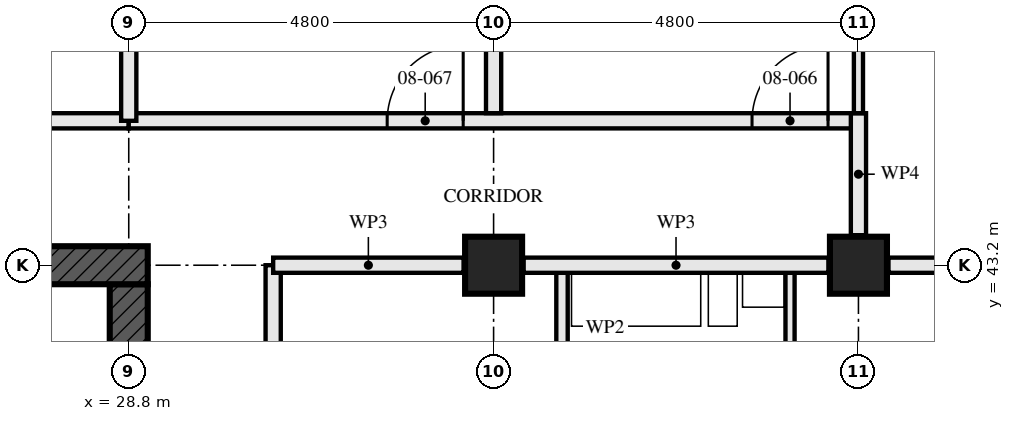
"""IFC4 building model, lengths in metres.
Left out: names, types, materials, properties, quantities, classifications, styles, units other than length and angle.
Written with IfcOpenShell. Run it as: python <this file> out.ifc"""

import sys

from ifc_helpers import new_model, si_unit, direction, frame, frame_2d, origin, origin_2d, place, context, subcontext, project, spatial, rectangle, hollow_rectangle, extrude, element, fill, save


model = new_model("IFC4")
c1 = context("Model", 3, precision=1e-05, world=origin(), true_north=direction((0.0, 1.0)))
c2 = subcontext(c1, "Body", "Model", "MODEL_VIEW")
j1 = project(units=[si_unit("LENGTHUNIT", "METRE"), si_unit("PLANEANGLEUNIT", "RADIAN")], contexts=[c1])
p1 = place(None, origin())
s1 = spatial("IfcSite", under=j1, at=p1, CompositionType="ELEMENT")
p2 = place(p1, origin())
s2 = spatial("IfcBuilding", under=s1, at=p2, CompositionType="ELEMENT")
p3 = place(p2, frame((0.0, 0.0, 34.0)))
s3 = spatial("IfcBuildingStorey", under=s2, at=p3, CompositionType="ELEMENT", Elevation=34.0)
for number, where, z_axis, x_axis in (
    (1, (33.6, 43.2, 0.0), (0.0, 0.0, 1.0), (0.0, 1.0, 0.0)),
    (2, (38.4, 43.2, 0.0), (0.0, 0.0, 1.0), (0.0, 1.0, 0.0)),
):
    element("IfcColumn", number, at=place(p3, frame(where, z_axis=z_axis, x_axis=x_axis)), inside=s3, PredefinedType="COLUMN", context=c2, shape_type="SweptSolid", body=[
        extrude(hollow_rectangle(XDim=0.75, YDim=0.75, WallThickness=0.08, at=origin_2d()), origin(), (0.0, 0.0, 1.0), 3.5),
    ])
p4 = place(p3, frame((29.05, 43.2, -0.17), z_axis=(0.0, 0.0, 1.0), x_axis=(-1.0, 0.0, 0.0)))
e3 = element("IfcWall", 3, at=p4, inside=s3, PredefinedType="SHEAR", context=c2, shape_type="SweptSolid", body=[
    extrude(rectangle(XDim=14.9, YDim=0.5, at=frame_2d((7.45, 0.0))), origin(), (0.0, 0.0, 1.0), 3.5),
])
p5 = place(p4, frame((6.85, 0.0, 0.17)))
e4 = element("IfcOpeningElement", 4, at=p5, cuts=e3, PredefinedType="OPENING", context=c2, shape_type="SweptSolid", body=[
    extrude(rectangle(XDim=1.2, YDim=2.1, at=frame_2d((0.6, 1.05))), frame((0.0, 0.26, 0.0), z_axis=(0.0, -1.0, 0.0), x_axis=(1.0, 0.0, 0.0)), (0.0, 0.0, 1.0), 0.521),
])
p6 = place(p3, frame((28.8, 29.05, -0.17), z_axis=(0.0, 0.0, 1.0), x_axis=(0.0, 1.0, 0.0)))
e5 = element("IfcWall", 5, at=p6, inside=s3, PredefinedType="SHEAR", context=c2, shape_type="SweptSolid", body=[
    extrude(rectangle(XDim=13.9, YDim=0.5, at=frame_2d((6.95, 0.0))), origin(), (0.0, 0.0, 1.0), 3.5),
])
p7 = place(p6, frame((6.35, 0.0, 0.17)))
e6 = element("IfcOpeningElement", 6, at=p7, cuts=e5, PredefinedType="OPENING", context=c2, shape_type="SweptSolid", body=[
    extrude(rectangle(XDim=1.2, YDim=2.1, at=frame_2d((0.6, 1.05))), frame((0.0, 0.26, 0.0), z_axis=(0.0, -1.0, 0.0), x_axis=(1.0, 0.0, 0.0)), (0.0, 0.0, 1.0), 0.521),
])
p8 = place(p3, frame((28.8, 45.1, 0.0), z_axis=(0.0, 0.0, 1.0), x_axis=(-1.0, 0.0, 0.0)))
e7 = element("IfcWall", 7, at=p8, inside=s3, PredefinedType="PARTITIONING", context=c2, shape_type="SweptSolid", body=[
    extrude(rectangle(XDim=14.4, YDim=0.2, at=frame_2d((7.2, 0.0))), origin(), (0.0, 0.0, 1.0), 3.33),
])
p9 = place(p8, frame((5.2, 0.0, 0.0)))
e8 = element("IfcOpeningElement", 8, at=p9, cuts=e7, PredefinedType="OPENING", context=c2, shape_type="SweptSolid", body=[
    extrude(rectangle(XDim=1.0, YDim=2.1, at=frame_2d((0.5, 1.05))), frame((0.0, 0.111, 0.0), z_axis=(0.0, -1.0, 0.0), x_axis=(1.0, 0.0, 0.0)), (0.0, 0.0, 1.0), 0.221),
])
p10 = place(p8, frame((10.0, 0.0, 0.0)))
e9 = element("IfcOpeningElement", 9, at=p10, cuts=e7, PredefinedType="OPENING", context=c2, shape_type="SweptSolid", body=[
    extrude(rectangle(XDim=1.0, YDim=2.1, at=frame_2d((0.5, 1.05))), frame((0.0, 0.111, 0.0), z_axis=(0.0, -1.0, 0.0), x_axis=(1.0, 0.0, 0.0)), (0.0, 0.0, 1.0), 0.221),
])
p11 = place(p3, frame((34.5, 40.4, 0.0), z_axis=(0.0, 0.0, 1.0), x_axis=(0.0, 1.0, 0.0)))
e10 = element("IfcWall", 10, at=p11, inside=s3, PredefinedType="PARTITIONING", context=c2, shape_type="SweptSolid", body=[
    extrude(rectangle(XDim=2.8, YDim=0.15, at=frame_2d((1.4, 0.0))), origin(), (0.0, 0.0, 1.0), 3.33),
])
p12 = place(p3, frame((37.5, 38.4, 0.0), z_axis=(0.0, 0.0, 1.0), x_axis=(0.0, 1.0, 0.0)))
e11 = element("IfcWall", 11, at=p12, inside=s3, PredefinedType="PARTITIONING", context=c2, shape_type="SweptSolid", body=[
    extrude(rectangle(XDim=4.8, YDim=0.12, at=frame_2d((2.4, 0.0))), origin(), (0.0, 0.0, 1.0), 3.33),
])
p13 = place(p12, frame((0.45, 0.0, 0.0)))
e12 = element("IfcOpeningElement", 12, at=p13, cuts=e11, PredefinedType="OPENING", context=c2, shape_type="SweptSolid", body=[
    extrude(rectangle(XDim=0.9, YDim=2.1, at=frame_2d((0.45, 1.05))), frame((0.0, 0.071, 0.0), z_axis=(0.0, -1.0, 0.0), x_axis=(1.0, 0.0, 0.0)), (0.0, 0.0, 1.0), 0.141),
])
p14 = place(p3, frame((30.7, 28.8, 0.0), z_axis=(0.0, 0.0, 1.0), x_axis=(0.0, 1.0, 0.0)))
e13 = element("IfcWall", 13, at=p14, inside=s3, PredefinedType="PARTITIONING", context=c2, shape_type="SweptSolid", body=[
    extrude(rectangle(XDim=14.4, YDim=0.2, at=frame_2d((7.2, 0.0))), origin(), (0.0, 0.0, 1.0), 2.55),
])
p15 = place(p14, frame((1.4, 0.0, 0.0)))
e14 = element("IfcOpeningElement", 14, at=p15, cuts=e13, PredefinedType="OPENING", context=c2, shape_type="SweptSolid", body=[
    extrude(rectangle(XDim=1.0, YDim=2.1, at=frame_2d((0.5, 1.05))), frame((0.0, 0.111, 0.0), z_axis=(0.0, -1.0, 0.0), x_axis=(1.0, 0.0, 0.0)), (0.0, 0.0, 1.0), 0.221),
])
p16 = place(p14, frame((4.1, 0.0, 0.0)))
e15 = element("IfcOpeningElement", 15, at=p16, cuts=e13, PredefinedType="OPENING", context=c2, shape_type="SweptSolid", body=[
    extrude(rectangle(XDim=1.0, YDim=2.1, at=frame_2d((0.5, 1.05))), frame((0.0, 0.111, 0.0), z_axis=(0.0, -1.0, 0.0), x_axis=(1.0, 0.0, 0.0)), (0.0, 0.0, 1.0), 0.221),
])
p17 = place(p14, frame((5.975, 0.0, 0.0)))
e16 = element("IfcOpeningElement", 16, at=p17, cuts=e13, PredefinedType="OPENING", context=c2, shape_type="SweptSolid", body=[
    extrude(rectangle(XDim=1.0, YDim=2.1, at=frame_2d((0.5, 1.05))), frame((0.0, 0.111, 0.0), z_axis=(0.0, -1.0, 0.0), x_axis=(1.0, 0.0, 0.0)), (0.0, 0.0, 1.0), 0.221),
])
p18 = place(p14, frame((10.0, 0.0, 0.0)))
e17 = element("IfcOpeningElement", 17, at=p18, cuts=e13, PredefinedType="OPENING", context=c2, shape_type="SweptSolid", body=[
    extrude(rectangle(XDim=1.0, YDim=2.1, at=frame_2d((0.5, 1.05))), frame((0.0, 0.111, 0.0), z_axis=(0.0, -1.0, 0.0), x_axis=(1.0, 0.0, 0.0)), (0.0, 0.0, 1.0), 0.221),
])
p19 = place(p3, frame((38.4, 48.2, 0.0), z_axis=(0.0, 0.0, 1.0), x_axis=(0.0, -1.0, 0.0)))
e18 = element("IfcWall", 18, at=p19, inside=s3, PredefinedType="PARTITIONING", context=c2, shape_type="SweptSolid", body=[
    extrude(rectangle(XDim=3.0, YDim=0.12, at=frame_2d((1.5, 0.0))), origin(), (0.0, 0.0, 1.0), 2.55),
])
p20 = place(p19, frame((1.075, 0.0, 0.0)))
e19 = element("IfcOpeningElement", 19, at=p20, cuts=e18, PredefinedType="OPENING", context=c2, shape_type="SweptSolid", body=[
    extrude(rectangle(XDim=0.9, YDim=2.1, at=frame_2d((0.45, 1.05))), frame((0.0, 0.071, 0.0), z_axis=(0.0, -1.0, 0.0), x_axis=(1.0, 0.0, 0.0)), (0.0, 0.0, 1.0), 0.141),
])
p21 = place(p3, frame((33.6, 57.353, 0.0), z_axis=(0.0, 0.0, 1.0), x_axis=(0.0, -1.0, 0.0)))
e20 = element("IfcWall", 20, at=p21, inside=s3, PredefinedType="PARTITIONING", context=c2, shape_type="SweptSolid", body=[
    extrude(rectangle(XDim=12.153, YDim=0.2, at=frame_2d((6.077, 0.0))), origin(), (0.0, 0.0, 1.0), 2.55),
])
p22 = place(p3, frame((38.4, 45.1, 0.0), z_axis=(0.0, 0.0, 1.0), x_axis=(-1.0, 0.0, 0.0)))
e21 = element("IfcWall", 21, at=p22, inside=s3, PredefinedType="PARTITIONING", context=c2, shape_type="SweptSolid", body=[
    extrude(rectangle(XDim=9.6, YDim=0.2, at=frame_2d((4.8, 0.0))), origin(), (0.0, 0.0, 1.0), 3.33),
])
p23 = place(p22, frame((0.4, 0.0, 0.0)))
e22 = element("IfcOpeningElement", 22, at=p23, cuts=e21, PredefinedType="OPENING", context=c2, shape_type="SweptSolid", body=[
    extrude(rectangle(XDim=1.0, YDim=2.1, at=frame_2d((0.5, 1.05))), frame((0.0, 0.111, 0.0), z_axis=(0.0, -1.0, 0.0), x_axis=(1.0, 0.0, 0.0)), (0.0, 0.0, 1.0), 0.221),
])
p24 = place(p22, frame((5.2, 0.0, 0.0)))
e23 = element("IfcOpeningElement", 23, at=p24, cuts=e21, PredefinedType="OPENING", context=c2, shape_type="SweptSolid", body=[
    extrude(rectangle(XDim=1.0, YDim=2.1, at=frame_2d((0.5, 1.05))), frame((0.0, 0.111, 0.0), z_axis=(0.0, -1.0, 0.0), x_axis=(1.0, 0.0, 0.0)), (0.0, 0.0, 1.0), 0.221),
])
p25 = place(p3, frame((38.4, 45.2, 0.0), z_axis=(0.0, 0.0, 1.0), x_axis=(0.0, -1.0, 0.0)))
e24 = element("IfcWall", 24, at=p25, inside=s3, PredefinedType="PARTITIONING", context=c2, shape_type="SweptSolid", body=[
    extrude(rectangle(XDim=1.605, YDim=0.2, at=frame_2d((0.802, 0.0))), origin(), (0.0, 0.0, 1.0), 3.33),
])
p26 = place(p3, frame((28.8, 45.1, 0.0), z_axis=(0.0, 0.0, 1.0), x_axis=(0.0, 1.0, 0.0)))
e25 = element("IfcWall", 25, at=p26, inside=s3, PredefinedType="PARTITIONING", context=c2, shape_type="SweptSolid", body=[
    extrude(rectangle(XDim=2.53, YDim=0.2, at=frame_2d((1.265, 0.0))), origin(), (0.0, 0.0, 1.0), 2.32),
])
p27 = place(p3, frame((42.896, 43.2, 0.0), z_axis=(0.0, 0.0, 1.0), x_axis=(-1.0, 0.0, 0.0)))
e26 = element("IfcWall", 26, at=p27, inside=s3, PredefinedType="PARTITIONING", context=c2, shape_type="SweptSolid", body=[
    extrude(rectangle(XDim=4.101, YDim=0.2, at=frame_2d((2.05, 0.0))), origin(), (0.0, 0.0, 1.0), 2.32),
])
p28 = place(p3, frame((38.005, 43.2, 0.0), z_axis=(0.0, 0.0, 1.0), x_axis=(-1.0, 0.0, 0.0)))
e27 = element("IfcWall", 27, at=p28, inside=s3, PredefinedType="PARTITIONING", context=c2, shape_type="SweptSolid", body=[
    extrude(rectangle(XDim=4.01, YDim=0.2, at=frame_2d((2.005, 0.0))), origin(), (0.0, 0.0, 1.0), 2.32),
])
p29 = place(p3, frame((33.205, 43.2, 0.0), z_axis=(0.0, 0.0, 1.0), x_axis=(-1.0, 0.0, 0.0)))
e28 = element("IfcWall", 28, at=p29, inside=s3, PredefinedType="PARTITIONING", context=c2, shape_type="SweptSolid", body=[
    extrude(rectangle(XDim=2.505, YDim=0.2, at=frame_2d((1.252, 0.0))), origin(), (0.0, 0.0, 1.0), 2.32),
])
p30 = place(p23, frame((1.0, 0.0, 0.0), z_axis=(0.0, 0.0, 1.0), x_axis=(-1.0, 0.0, 0.0)))
e29 = element("IfcDoor", 29, at=p30, inside=s3, OperationType="SINGLE_SWING_LEFT", PredefinedType="DOOR", context=c2, shape_type="SweptSolid", body=[
    extrude(rectangle(XDim=1.0, YDim=2.1, at=frame_2d((0.5, 1.05))), frame((0.0, 0.027, 0.0), z_axis=(0.0, -1.0, 0.0), x_axis=(1.0, 0.0, 0.0)), (0.0, 0.0, 1.0), 0.054),
])
fill(e22, e29)
p31 = place(p24, frame((1.0, 0.0, 0.0), z_axis=(0.0, 0.0, 1.0), x_axis=(-1.0, 0.0, 0.0)))
e30 = element("IfcDoor", 30, at=p31, inside=s3, OperationType="SINGLE_SWING_LEFT", PredefinedType="DOOR", context=c2, shape_type="SweptSolid", body=[
    extrude(rectangle(XDim=1.0, YDim=2.1, at=frame_2d((0.5, 1.05))), frame((0.0, 0.027, 0.0), z_axis=(0.0, -1.0, 0.0), x_axis=(1.0, 0.0, 0.0)), (0.0, 0.0, 1.0), 0.054),
])
fill(e23, e30)
save(model, sys.argv[1])
